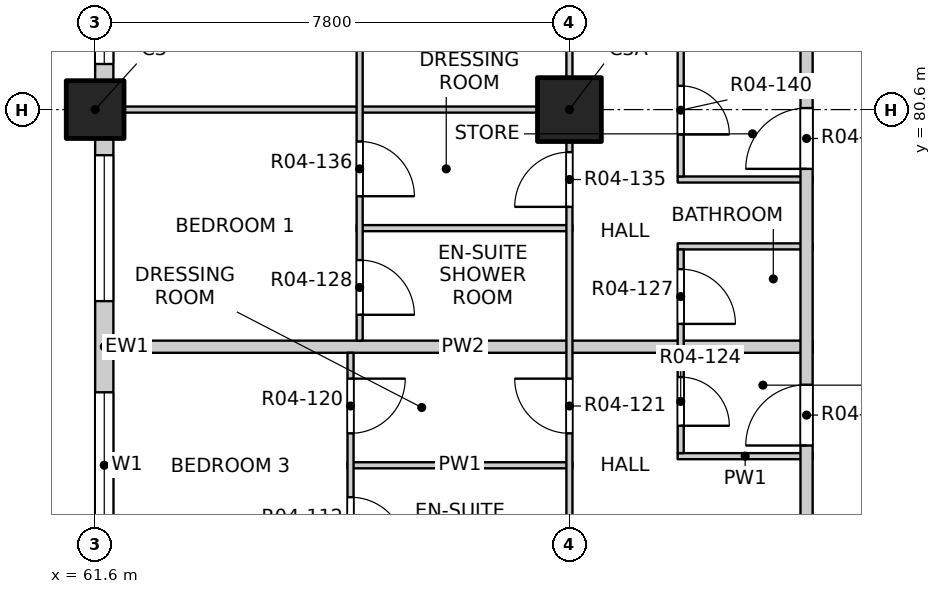
"""IFC4 building model, lengths in metres.
Left out: names, types, materials, properties, quantities, classifications, styles, units other than length and angle.
Written with IfcOpenShell. Run it as: python <this file> out.ifc"""

import sys

from ifc_helpers import new_model, si_unit, direction, frame, frame_2d, origin, origin_2d, place, context, subcontext, project, spatial, rectangle, extrude, element, fill, save


model = new_model("IFC4")
c1 = context("Model", 3, precision=1e-05, world=origin(), true_north=direction((0.0, 1.0)))
c2 = subcontext(c1, "Body", "Model", "MODEL_VIEW")
j1 = project(units=[si_unit("LENGTHUNIT", "METRE"), si_unit("PLANEANGLEUNIT", "RADIAN")], contexts=[c1])
p1 = place(None, origin())
s1 = spatial("IfcSite", under=j1, at=p1, CompositionType="ELEMENT")
p2 = place(p1, origin())
s2 = spatial("IfcBuilding", under=s1, at=p2, CompositionType="ELEMENT")
p3 = place(p2, frame((0.0, 0.0, 58.0)))
s3 = spatial("IfcBuildingStorey", under=s2, at=p3, CompositionType="ELEMENT", Elevation=58.0)
p4 = place(p3, frame((61.6, 80.6, -0.25), z_axis=(0.0, 0.0, 1.0), x_axis=(1.0, 0.0, 0.0)))
e1 = element("IfcColumn", 1, at=p4, inside=s3, PredefinedType="COLUMN", context=c2, shape_type="SweptSolid", body=[
    extrude(rectangle(XDim=0.95, YDim=0.95, at=origin_2d()), origin(), (0.0, 0.0, 1.0), 3.4),
])
p5 = place(p3, frame((69.4, 80.6, -0.25), z_axis=(0.0, 0.0, 1.0), x_axis=(1.0, 0.0, 0.0)))
e2 = element("IfcColumn", 2, at=p5, inside=s3, PredefinedType="COLUMN", context=c2, shape_type="SweptSolid", body=[
    extrude(rectangle(XDim=1.05, YDim=1.05, at=origin_2d()), origin(), (0.0, 0.0, 1.0), 3.4),
])
p6 = place(p3, frame((61.75, 73.275, 0.0), z_axis=(0.0, 0.0, 1.0), x_axis=(0.0, 1.0, 0.0)))
e3 = element("IfcWall", 3, at=p6, inside=s3, PredefinedType="SOLIDWALL", context=c2, shape_type="SweptSolid", body=[
    extrude(rectangle(XDim=6.85, YDim=0.3, at=frame_2d((3.425, 0.0))), origin(), (0.0, 0.0, 1.0), 2.7),
])
p7 = place(p6, frame((0.275, 0.0, 0.9)))
e4 = element("IfcOpeningElement", 4, at=p7, cuts=e3, PredefinedType="OPENING", context=c2, shape_type="SweptSolid", body=[
    extrude(rectangle(XDim=2.4, YDim=1.8, at=frame_2d((1.2, 0.9))), frame((0.0, 0.16, 0.0), z_axis=(0.0, -1.0, 0.0), x_axis=(1.0, 0.0, 0.0)), (0.0, 0.0, 1.0), 0.32),
])
p8 = place(p6, frame((4.175, 0.0, 0.9)))
e5 = element("IfcOpeningElement", 5, at=p8, cuts=e3, PredefinedType="OPENING", context=c2, shape_type="SweptSolid", body=[
    extrude(rectangle(XDim=2.4, YDim=1.8, at=frame_2d((1.2, 0.9))), frame((0.0, 0.16, 0.0), z_axis=(0.0, -1.0, 0.0), x_axis=(1.0, 0.0, 0.0)), (0.0, 0.0, 1.0), 0.32),
])
p9 = place(p3, frame((61.75, 81.075, 0.0), z_axis=(0.0, 0.0, 1.0), x_axis=(0.0, 1.0, 0.0)))
e6 = element("IfcWall", 6, at=p9, inside=s3, PredefinedType="SOLIDWALL", context=c2, shape_type="SweptSolid", body=[
    extrude(rectangle(XDim=3.425, YDim=0.3, at=frame_2d((1.712, 0.0))), origin(), (0.0, 0.0, 1.0), 2.7),
])
p10 = place(p9, frame((0.275, 0.0, 0.9)))
e7 = element("IfcOpeningElement", 7, at=p10, cuts=e6, PredefinedType="OPENING", context=c2, shape_type="SweptSolid", body=[
    extrude(rectangle(XDim=2.4, YDim=1.8, at=frame_2d((1.2, 0.9))), frame((0.0, 0.16, 0.0), z_axis=(0.0, -1.0, 0.0), x_axis=(1.0, 0.0, 0.0)), (0.0, 0.0, 1.0), 0.32),
])
p11 = place(p3, frame((65.75, 74.75, 0.0), z_axis=(0.0, 0.0, 1.0), x_axis=(1.0, 0.0, 0.0)))
e8 = element("IfcWall", 8, at=p11, inside=s3, PredefinedType="PARTITIONING", context=c2, shape_type="SweptSolid", body=[
    extrude(rectangle(XDim=3.7, YDim=0.1, at=frame_2d((1.85, 0.0))), origin(), (0.0, 0.0, 1.0), 3.15),
])
p12 = place(p3, frame((71.18, 74.9, 0.0), z_axis=(0.0, 0.0, 1.0), x_axis=(1.0, 0.0, 0.0)))
e9 = element("IfcWall", 9, at=p12, inside=s3, PredefinedType="PARTITIONING", context=c2, shape_type="SweptSolid", body=[
    extrude(rectangle(XDim=2.22, YDim=0.1, at=frame_2d((1.11, 0.0))), origin(), (0.0, 0.0, 1.0), 3.15),
])
p13 = place(p3, frame((61.9, 76.7, 0.0), z_axis=(0.0, 0.0, 1.0), x_axis=(1.0, 0.0, 0.0)))
e10 = element("IfcWall", 10, at=p13, inside=s3, PredefinedType="PARTITIONING", context=c2, shape_type="SweptSolid", body=[
    extrude(rectangle(XDim=11.5, YDim=0.2, at=frame_2d((5.75, 0.0))), origin(), (0.0, 0.0, 1.0), 3.15),
])
p14 = place(p3, frame((71.18, 78.35, 0.0), z_axis=(0.0, 0.0, 1.0), x_axis=(1.0, 0.0, 0.0)))
e11 = element("IfcWall", 11, at=p14, inside=s3, PredefinedType="PARTITIONING", context=c2, shape_type="SweptSolid", body=[
    extrude(rectangle(XDim=2.22, YDim=0.1, at=frame_2d((1.11, 0.0))), origin(), (0.0, 0.0, 1.0), 3.15),
])
p15 = place(p3, frame((65.9, 78.65, 0.0), z_axis=(0.0, 0.0, 1.0), x_axis=(1.0, 0.0, 0.0)))
e12 = element("IfcWall", 12, at=p15, inside=s3, PredefinedType="PARTITIONING", context=c2, shape_type="SweptSolid", body=[
    extrude(rectangle(XDim=3.55, YDim=0.1, at=frame_2d((1.775, 0.0))), origin(), (0.0, 0.0, 1.0), 3.15),
])
p16 = place(p3, frame((71.18, 79.45, 0.0), z_axis=(0.0, 0.0, 1.0), x_axis=(1.0, 0.0, 0.0)))
e13 = element("IfcWall", 13, at=p16, inside=s3, PredefinedType="PARTITIONING", context=c2, shape_type="SweptSolid", body=[
    extrude(rectangle(XDim=2.22, YDim=0.1, at=frame_2d((1.11, 0.0))), origin(), (0.0, 0.0, 1.0), 3.15),
])
p17 = place(p3, frame((61.9, 80.6, 0.0), z_axis=(0.0, 0.0, 1.0), x_axis=(1.0, 0.0, 0.0)))
e14 = element("IfcWall", 14, at=p17, inside=s3, PredefinedType="PARTITIONING", context=c2, shape_type="SweptSolid", body=[
    extrude(rectangle(XDim=7.55, YDim=0.1, at=frame_2d((3.775, 0.0))), origin(), (0.0, 0.0, 1.0), 2.55),
])
p18 = place(p3, frame((65.8, 61.2, 0.0), z_axis=(0.0, 0.0, 1.0), x_axis=(0.0, 1.0, 0.0)))
e15 = element("IfcWall", 15, at=p18, inside=s3, PredefinedType="PARTITIONING", context=c2, shape_type="SweptSolid", body=[
    extrude(rectangle(XDim=15.4, YDim=0.1, at=frame_2d((7.7, 0.0))), origin(), (0.0, 0.0, 1.0), 3.15),
])
p19 = place(p18, frame((1.25, 0.0, 0.0)))
e16 = element("IfcOpeningElement", 16, at=p19, cuts=e15, PredefinedType="OPENING", context=c2, shape_type="SweptSolid", body=[
    extrude(rectangle(XDim=1.2, YDim=2.1, at=frame_2d((0.6, 1.05))), frame((0.0, 0.06, 0.0), z_axis=(0.0, -1.0, 0.0), x_axis=(1.0, 0.0, 0.0)), (0.0, 0.0, 1.0), 0.12),
])
p20 = place(p18, frame((4.325, 0.0, 0.0)))
e17 = element("IfcOpeningElement", 17, at=p20, cuts=e15, PredefinedType="OPENING", context=c2, shape_type="SweptSolid", body=[
    extrude(rectangle(XDim=0.9, YDim=2.1, at=frame_2d((0.45, 1.05))), frame((0.0, 0.06, 0.0), z_axis=(0.0, -1.0, 0.0), x_axis=(1.0, 0.0, 0.0)), (0.0, 0.0, 1.0), 0.12),
])
p21 = place(p18, frame((6.275, 0.0, 0.0)))
e18 = element("IfcOpeningElement", 18, at=p21, cuts=e15, PredefinedType="OPENING", context=c2, shape_type="SweptSolid", body=[
    extrude(rectangle(XDim=0.9, YDim=2.1, at=frame_2d((0.45, 1.05))), frame((0.0, 0.06, 0.0), z_axis=(0.0, -1.0, 0.0), x_axis=(1.0, 0.0, 0.0)), (0.0, 0.0, 1.0), 0.12),
])
p22 = place(p18, frame((8.225, 0.0, 0.0)))
e19 = element("IfcOpeningElement", 19, at=p22, cuts=e15, PredefinedType="OPENING", context=c2, shape_type="SweptSolid", body=[
    extrude(rectangle(XDim=0.9, YDim=2.1, at=frame_2d((0.45, 1.05))), frame((0.0, 0.06, 0.0), z_axis=(0.0, -1.0, 0.0), x_axis=(1.0, 0.0, 0.0)), (0.0, 0.0, 1.0), 0.12),
])
p23 = place(p18, frame((10.175, 0.0, 0.0)))
e20 = element("IfcOpeningElement", 20, at=p23, cuts=e15, PredefinedType="OPENING", context=c2, shape_type="SweptSolid", body=[
    extrude(rectangle(XDim=0.9, YDim=2.1, at=frame_2d((0.45, 1.05))), frame((0.0, 0.06, 0.0), z_axis=(0.0, -1.0, 0.0), x_axis=(1.0, 0.0, 0.0)), (0.0, 0.0, 1.0), 0.12),
])
p24 = place(p18, frame((12.125, 0.0, 0.0)))
e21 = element("IfcOpeningElement", 21, at=p24, cuts=e15, PredefinedType="OPENING", context=c2, shape_type="SweptSolid", body=[
    extrude(rectangle(XDim=0.9, YDim=2.1, at=frame_2d((0.45, 1.05))), frame((0.0, 0.06, 0.0), z_axis=(0.0, -1.0, 0.0), x_axis=(1.0, 0.0, 0.0)), (0.0, 0.0, 1.0), 0.12),
])
p25 = place(p18, frame((14.075, 0.0, 0.0)))
e22 = element("IfcOpeningElement", 22, at=p25, cuts=e15, PredefinedType="OPENING", context=c2, shape_type="SweptSolid", body=[
    extrude(rectangle(XDim=0.9, YDim=2.1, at=frame_2d((0.45, 1.05))), frame((0.0, 0.06, 0.0), z_axis=(0.0, -1.0, 0.0), x_axis=(1.0, 0.0, 0.0)), (0.0, 0.0, 1.0), 0.12),
])
p26 = place(p3, frame((65.95, 76.8, 0.0), z_axis=(0.0, 0.0, 1.0), x_axis=(0.0, 1.0, 0.0)))
e23 = element("IfcWall", 23, at=p26, inside=s3, PredefinedType="PARTITIONING", context=c2, shape_type="SweptSolid", body=[
    extrude(rectangle(XDim=11.3, YDim=0.1, at=frame_2d((5.65, 0.0))), origin(), (0.0, 0.0, 1.0), 3.15),
])
p27 = place(p26, frame((0.425, 0.0, 0.0)))
e24 = element("IfcOpeningElement", 24, at=p27, cuts=e23, PredefinedType="OPENING", context=c2, shape_type="SweptSolid", body=[
    extrude(rectangle(XDim=0.9, YDim=2.1, at=frame_2d((0.45, 1.05))), frame((0.0, 0.06, 0.0), z_axis=(0.0, -1.0, 0.0), x_axis=(1.0, 0.0, 0.0)), (0.0, 0.0, 1.0), 0.12),
])
p28 = place(p26, frame((2.375, 0.0, 0.0)))
e25 = element("IfcOpeningElement", 25, at=p28, cuts=e23, PredefinedType="OPENING", context=c2, shape_type="SweptSolid", body=[
    extrude(rectangle(XDim=0.9, YDim=2.1, at=frame_2d((0.45, 1.05))), frame((0.0, 0.06, 0.0), z_axis=(0.0, -1.0, 0.0), x_axis=(1.0, 0.0, 0.0)), (0.0, 0.0, 1.0), 0.12),
])
p29 = place(p26, frame((5.15, 0.0, 0.0)))
e26 = element("IfcOpeningElement", 26, at=p29, cuts=e23, PredefinedType="OPENING", context=c2, shape_type="SweptSolid", body=[
    extrude(rectangle(XDim=1.2, YDim=2.1, at=frame_2d((0.6, 1.05))), frame((0.0, 0.06, 0.0), z_axis=(0.0, -1.0, 0.0), x_axis=(1.0, 0.0, 0.0)), (0.0, 0.0, 1.0), 0.12),
])
p30 = place(p26, frame((9.05, 0.0, 0.0)))
e27 = element("IfcOpeningElement", 27, at=p30, cuts=e23, PredefinedType="OPENING", context=c2, shape_type="SweptSolid", body=[
    extrude(rectangle(XDim=1.2, YDim=2.1, at=frame_2d((0.6, 1.05))), frame((0.0, 0.06, 0.0), z_axis=(0.0, -1.0, 0.0), x_axis=(1.0, 0.0, 0.0)), (0.0, 0.0, 1.0), 0.12),
])
p31 = place(p3, frame((69.4, 49.4, 0.0), z_axis=(0.0, 0.0, 1.0), x_axis=(0.0, 1.0, 0.0)))
e28 = element("IfcWall", 28, at=p31, inside=s3, PredefinedType="PARTITIONING", context=c2, shape_type="SweptSolid", body=[
    extrude(rectangle(XDim=31.2, YDim=0.1, at=frame_2d((15.6, 0.0))), origin(), (0.0, 0.0, 1.0), 3.15),
])
p32 = place(p31, frame((2.475, 0.0, 0.0)))
e29 = element("IfcOpeningElement", 29, at=p32, cuts=e28, PredefinedType="OPENING", context=c2, shape_type="SweptSolid", body=[
    extrude(rectangle(XDim=0.9, YDim=2.1, at=frame_2d((0.45, 1.05))), frame((0.0, 0.06, 0.0), z_axis=(0.0, -1.0, 0.0), x_axis=(1.0, 0.0, 0.0)), (0.0, 0.0, 1.0), 0.12),
])
p33 = place(p31, frame((5.4, 0.0, 0.0)))
e30 = element("IfcOpeningElement", 30, at=p33, cuts=e28, PredefinedType="OPENING", context=c2, shape_type="SweptSolid", body=[
    extrude(rectangle(XDim=0.9, YDim=2.1, at=frame_2d((0.45, 1.05))), frame((0.0, 0.06, 0.0), z_axis=(0.0, -1.0, 0.0), x_axis=(1.0, 0.0, 0.0)), (0.0, 0.0, 1.0), 0.12),
])
p34 = place(p31, frame((10.275, 0.0, 0.0)))
e31 = element("IfcOpeningElement", 31, at=p34, cuts=e28, PredefinedType="OPENING", context=c2, shape_type="SweptSolid", body=[
    extrude(rectangle(XDim=0.9, YDim=2.1, at=frame_2d((0.45, 1.05))), frame((0.0, 0.06, 0.0), z_axis=(0.0, -1.0, 0.0), x_axis=(1.0, 0.0, 0.0)), (0.0, 0.0, 1.0), 0.12),
])
p35 = place(p31, frame((13.2, 0.0, 0.0)))
e32 = element("IfcOpeningElement", 32, at=p35, cuts=e28, PredefinedType="OPENING", context=c2, shape_type="SweptSolid", body=[
    extrude(rectangle(XDim=0.9, YDim=2.1, at=frame_2d((0.45, 1.05))), frame((0.0, 0.06, 0.0), z_axis=(0.0, -1.0, 0.0), x_axis=(1.0, 0.0, 0.0)), (0.0, 0.0, 1.0), 0.12),
])
p36 = place(p31, frame((18.075, 0.0, 0.0)))
e33 = element("IfcOpeningElement", 33, at=p36, cuts=e28, PredefinedType="OPENING", context=c2, shape_type="SweptSolid", body=[
    extrude(rectangle(XDim=0.9, YDim=2.1, at=frame_2d((0.45, 1.05))), frame((0.0, 0.06, 0.0), z_axis=(0.0, -1.0, 0.0), x_axis=(1.0, 0.0, 0.0)), (0.0, 0.0, 1.0), 0.12),
])
p37 = place(p31, frame((21.8, 0.0, 0.0)))
e34 = element("IfcOpeningElement", 34, at=p37, cuts=e28, PredefinedType="OPENING", context=c2, shape_type="SweptSolid", body=[
    extrude(rectangle(XDim=0.9, YDim=2.1, at=frame_2d((0.45, 1.05))), frame((0.0, 0.06, 0.0), z_axis=(0.0, -1.0, 0.0), x_axis=(1.0, 0.0, 0.0)), (0.0, 0.0, 1.0), 0.12),
])
p38 = place(p31, frame((25.875, 0.0, 0.0)))
e35 = element("IfcOpeningElement", 35, at=p38, cuts=e28, PredefinedType="OPENING", context=c2, shape_type="SweptSolid", body=[
    extrude(rectangle(XDim=0.9, YDim=2.1, at=frame_2d((0.45, 1.05))), frame((0.0, 0.06, 0.0), z_axis=(0.0, -1.0, 0.0), x_axis=(1.0, 0.0, 0.0)), (0.0, 0.0, 1.0), 0.12),
])
p39 = place(p31, frame((29.6, 0.0, 0.0)))
e36 = element("IfcOpeningElement", 36, at=p39, cuts=e28, PredefinedType="OPENING", context=c2, shape_type="SweptSolid", body=[
    extrude(rectangle(XDim=0.9, YDim=2.1, at=frame_2d((0.45, 1.05))), frame((0.0, 0.06, 0.0), z_axis=(0.0, -1.0, 0.0), x_axis=(1.0, 0.0, 0.0)), (0.0, 0.0, 1.0), 0.12),
])
p40 = place(p3, frame((69.4, 80.6, 0.0), z_axis=(0.0, 0.0, 1.0), x_axis=(0.0, 1.0, 0.0)))
e37 = element("IfcWall", 37, at=p40, inside=s3, PredefinedType="PARTITIONING", context=c2, shape_type="SweptSolid", body=[
    extrude(rectangle(XDim=7.5, YDim=0.1, at=frame_2d((3.75, 0.0))), origin(), (0.0, 0.0, 1.0), 2.55),
])
p41 = place(p40, frame((1.5, 0.0, 0.0)))
e38 = element("IfcOpeningElement", 38, at=p41, cuts=e37, PredefinedType="OPENING", context=c2, shape_type="SweptSolid", body=[
    extrude(rectangle(XDim=0.9, YDim=2.1, at=frame_2d((0.45, 1.05))), frame((0.0, 0.06, 0.0), z_axis=(0.0, -1.0, 0.0), x_axis=(1.0, 0.0, 0.0)), (0.0, 0.0, 1.0), 0.12),
])
p42 = place(p40, frame((5.4, 0.0, 0.0)))
e39 = element("IfcOpeningElement", 39, at=p42, cuts=e37, PredefinedType="OPENING", context=c2, shape_type="SweptSolid", body=[
    extrude(rectangle(XDim=0.9, YDim=2.1, at=frame_2d((0.45, 1.05))), frame((0.0, 0.06, 0.0), z_axis=(0.0, -1.0, 0.0), x_axis=(1.0, 0.0, 0.0)), (0.0, 0.0, 1.0), 0.12),
])
p43 = place(p3, frame((71.23, 74.95, 0.0), z_axis=(0.0, 0.0, 1.0), x_axis=(0.0, 1.0, 0.0)))
e40 = element("IfcWall", 40, at=p43, inside=s3, PredefinedType="PARTITIONING", context=c2, shape_type="SweptSolid", body=[
    extrude(rectangle(XDim=3.35, YDim=0.1, at=frame_2d((1.675, 0.0))), origin(), (0.0, 0.0, 1.0), 3.15),
])
p44 = place(p43, frame((0.45, 0.0, 0.0)))
e41 = element("IfcOpeningElement", 41, at=p44, cuts=e40, PredefinedType="OPENING", context=c2, shape_type="SweptSolid", body=[
    extrude(rectangle(XDim=0.8, YDim=2.1, at=frame_2d((0.4, 1.05))), frame((0.0, 0.06, 0.0), z_axis=(0.0, -1.0, 0.0), x_axis=(1.0, 0.0, 0.0)), (0.0, 0.0, 1.0), 0.12),
])
p45 = place(p43, frame((2.125, 0.0, 0.0)))
e42 = element("IfcOpeningElement", 42, at=p45, cuts=e40, PredefinedType="OPENING", context=c2, shape_type="SweptSolid", body=[
    extrude(rectangle(XDim=0.9, YDim=2.1, at=frame_2d((0.45, 1.05))), frame((0.0, 0.06, 0.0), z_axis=(0.0, -1.0, 0.0), x_axis=(1.0, 0.0, 0.0)), (0.0, 0.0, 1.0), 0.12),
])
p46 = place(p3, frame((71.23, 79.5, 0.0), z_axis=(0.0, 0.0, 1.0), x_axis=(0.0, 1.0, 0.0)))
e43 = element("IfcWall", 43, at=p46, inside=s3, PredefinedType="PARTITIONING", context=c2, shape_type="SweptSolid", body=[
    extrude(rectangle(XDim=4.95, YDim=0.1, at=frame_2d((2.475, 0.0))), origin(), (0.0, 0.0, 1.0), 3.15),
])
p47 = place(p46, frame((0.69, 0.0, 0.0)))
e44 = element("IfcOpeningElement", 44, at=p47, cuts=e43, PredefinedType="OPENING", context=c2, shape_type="SweptSolid", body=[
    extrude(rectangle(XDim=0.8, YDim=2.1, at=frame_2d((0.4, 1.05))), frame((0.0, 0.06, 0.0), z_axis=(0.0, -1.0, 0.0), x_axis=(1.0, 0.0, 0.0)), (0.0, 0.0, 1.0), 0.12),
])
p48 = place(p46, frame((3.165, 0.0, 0.0)))
e45 = element("IfcOpeningElement", 45, at=p48, cuts=e43, PredefinedType="OPENING", context=c2, shape_type="SweptSolid", body=[
    extrude(rectangle(XDim=0.9, YDim=2.1, at=frame_2d((0.45, 1.05))), frame((0.0, 0.06, 0.0), z_axis=(0.0, -1.0, 0.0), x_axis=(1.0, 0.0, 0.0)), (0.0, 0.0, 1.0), 0.12),
])
p49 = place(p3, frame((73.3, 53.4, 0.0), z_axis=(0.0, 0.0, 1.0), x_axis=(0.0, 1.0, 0.0)))
e46 = element("IfcWall", 46, at=p49, inside=s3, PredefinedType="PARTITIONING", context=c2, shape_type="SweptSolid", body=[
    extrude(rectangle(XDim=31.0, YDim=0.2, at=frame_2d((15.5, 0.0))), origin(), (0.0, 0.0, 1.0), 3.15),
])
p50 = place(p49, frame((3.325, 0.0, 0.0)))
e47 = element("IfcOpeningElement", 47, at=p50, cuts=e46, PredefinedType="OPENING", context=c2, shape_type="SweptSolid", body=[
    extrude(rectangle(XDim=1.0, YDim=2.1, at=frame_2d((0.5, 1.05))), frame((0.0, 0.11, 0.0), z_axis=(0.0, -1.0, 0.0), x_axis=(1.0, 0.0, 0.0)), (0.0, 0.0, 1.0), 0.22),
])
p51 = place(p49, frame((21.675, 0.0, 0.0)))
e48 = element("IfcOpeningElement", 48, at=p51, cuts=e46, PredefinedType="OPENING", context=c2, shape_type="SweptSolid", body=[
    extrude(rectangle(XDim=1.0, YDim=2.1, at=frame_2d((0.5, 1.05))), frame((0.0, 0.11, 0.0), z_axis=(0.0, -1.0, 0.0), x_axis=(1.0, 0.0, 0.0)), (0.0, 0.0, 1.0), 0.22),
])
p52 = place(p49, frame((26.225, 0.0, 0.0)))
e49 = element("IfcOpeningElement", 49, at=p52, cuts=e46, PredefinedType="OPENING", context=c2, shape_type="SweptSolid", body=[
    extrude(rectangle(XDim=1.0, YDim=2.1, at=frame_2d((0.5, 1.05))), frame((0.0, 0.11, 0.0), z_axis=(0.0, -1.0, 0.0), x_axis=(1.0, 0.0, 0.0)), (0.0, 0.0, 1.0), 0.22),
])
p53 = place(p7, origin())
e50 = element("IfcWindow", 50, at=p53, inside=s3, PartitioningType="DOUBLE_PANEL_VERTICAL", PredefinedType="WINDOW", context=c2, shape_type="SweptSolid", body=[
    extrude(rectangle(XDim=2.4, YDim=1.8, at=frame_2d((1.2, 0.9))), frame((0.0, 0.03, 0.0), z_axis=(0.0, -1.0, 0.0), x_axis=(1.0, 0.0, 0.0)), (0.0, 0.0, 1.0), 0.06),
])
fill(e4, e50)
p54 = place(p8, origin())
e51 = element("IfcWindow", 51, at=p54, inside=s3, PartitioningType="DOUBLE_PANEL_VERTICAL", PredefinedType="WINDOW", context=c2, shape_type="SweptSolid", body=[
    extrude(rectangle(XDim=2.4, YDim=1.8, at=frame_2d((1.2, 0.9))), frame((0.0, 0.03, 0.0), z_axis=(0.0, -1.0, 0.0), x_axis=(1.0, 0.0, 0.0)), (0.0, 0.0, 1.0), 0.06),
])
fill(e5, e51)
p55 = place(p10, origin())
e52 = element("IfcWindow", 52, at=p55, inside=s3, PartitioningType="DOUBLE_PANEL_VERTICAL", PredefinedType="WINDOW", context=c2, shape_type="SweptSolid", body=[
    extrude(rectangle(XDim=2.4, YDim=1.8, at=frame_2d((1.2, 0.9))), frame((0.0, 0.03, 0.0), z_axis=(0.0, -1.0, 0.0), x_axis=(1.0, 0.0, 0.0)), (0.0, 0.0, 1.0), 0.06),
])
fill(e7, e52)
p56 = place(p24, origin())
e53 = element("IfcDoor", 53, at=p56, inside=s3, OperationType="SINGLE_SWING_RIGHT", PredefinedType="DOOR", context=c2, shape_type="SweptSolid", body=[
    extrude(rectangle(XDim=0.9, YDim=2.1, at=frame_2d((0.45, 1.05))), frame((0.0, 0.025, 0.0), z_axis=(0.0, -1.0, 0.0), x_axis=(1.0, 0.0, 0.0)), (0.0, 0.0, 1.0), 0.05),
])
fill(e21, e53)
p57 = place(p51, origin())
e54 = element("IfcDoor", 54, at=p57, inside=s3, OperationType="SINGLE_SWING_RIGHT", PredefinedType="DOOR", context=c2, shape_type="SweptSolid", body=[
    extrude(rectangle(XDim=1.0, YDim=2.1, at=frame_2d((0.5, 1.05))), frame((0.0, 0.025, 0.0), z_axis=(0.0, -1.0, 0.0), x_axis=(1.0, 0.0, 0.0)), (0.0, 0.0, 1.0), 0.05),
])
fill(e48, e54)
p58 = place(p25, origin())
e55 = element("IfcDoor", 55, at=p58, inside=s3, OperationType="SINGLE_SWING_LEFT", PredefinedType="DOOR", context=c2, shape_type="SweptSolid", body=[
    extrude(rectangle(XDim=0.9, YDim=2.1, at=frame_2d((0.45, 1.05))), frame((0.0, 0.025, 0.0), z_axis=(0.0, -1.0, 0.0), x_axis=(1.0, 0.0, 0.0)), (0.0, 0.0, 1.0), 0.05),
])
fill(e22, e55)
p59 = place(p38, origin())
e56 = element("IfcDoor", 56, at=p59, inside=s3, OperationType="SINGLE_SWING_RIGHT", PredefinedType="DOOR", context=c2, shape_type="SweptSolid", body=[
    extrude(rectangle(XDim=0.9, YDim=2.1, at=frame_2d((0.45, 1.05))), frame((0.0, 0.025, 0.0), z_axis=(0.0, -1.0, 0.0), x_axis=(1.0, 0.0, 0.0)), (0.0, 0.0, 1.0), 0.05),
])
fill(e35, e56)
p60 = place(p44, origin())
e57 = element("IfcDoor", 57, at=p60, inside=s3, OperationType="SINGLE_SWING_RIGHT", PredefinedType="DOOR", context=c2, shape_type="SweptSolid", body=[
    extrude(rectangle(XDim=0.8, YDim=2.1, at=frame_2d((0.4, 1.05))), frame((0.0, 0.025, 0.0), z_axis=(0.0, -1.0, 0.0), x_axis=(1.0, 0.0, 0.0)), (0.0, 0.0, 1.0), 0.05),
])
fill(e41, e57)
p61 = place(p45, origin())
e58 = element("IfcDoor", 58, at=p61, inside=s3, OperationType="SINGLE_SWING_RIGHT", PredefinedType="DOOR", context=c2, shape_type="SweptSolid", body=[
    extrude(rectangle(XDim=0.9, YDim=2.1, at=frame_2d((0.45, 1.05))), frame((0.0, 0.025, 0.0), z_axis=(0.0, -1.0, 0.0), x_axis=(1.0, 0.0, 0.0)), (0.0, 0.0, 1.0), 0.05),
])
fill(e42, e58)
p62 = place(p27, origin())
e59 = element("IfcDoor", 59, at=p62, inside=s3, OperationType="SINGLE_SWING_RIGHT", PredefinedType="DOOR", context=c2, shape_type="SweptSolid", body=[
    extrude(rectangle(XDim=0.9, YDim=2.1, at=frame_2d((0.45, 1.05))), frame((0.0, 0.025, 0.0), z_axis=(0.0, -1.0, 0.0), x_axis=(1.0, 0.0, 0.0)), (0.0, 0.0, 1.0), 0.05),
])
fill(e24, e59)
p63 = place(p39, origin())
e60 = element("IfcDoor", 60, at=p63, inside=s3, OperationType="SINGLE_SWING_LEFT", PredefinedType="DOOR", context=c2, shape_type="SweptSolid", body=[
    extrude(rectangle(XDim=0.9, YDim=2.1, at=frame_2d((0.45, 1.05))), frame((0.0, 0.025, 0.0), z_axis=(0.0, -1.0, 0.0), x_axis=(1.0, 0.0, 0.0)), (0.0, 0.0, 1.0), 0.05),
])
fill(e36, e60)
p64 = place(p28, origin())
e61 = element("IfcDoor", 61, at=p64, inside=s3, OperationType="SINGLE_SWING_RIGHT", PredefinedType="DOOR", context=c2, shape_type="SweptSolid", body=[
    extrude(rectangle(XDim=0.9, YDim=2.1, at=frame_2d((0.45, 1.05))), frame((0.0, 0.025, 0.0), z_axis=(0.0, -1.0, 0.0), x_axis=(1.0, 0.0, 0.0)), (0.0, 0.0, 1.0), 0.05),
])
fill(e25, e61)
p65 = place(p52, origin())
e62 = element("IfcDoor", 62, at=p65, inside=s3, OperationType="SINGLE_SWING_RIGHT", PredefinedType="DOOR", context=c2, shape_type="SweptSolid", body=[
    extrude(rectangle(XDim=1.0, YDim=2.1, at=frame_2d((0.5, 1.05))), frame((0.0, 0.025, 0.0), z_axis=(0.0, -1.0, 0.0), x_axis=(1.0, 0.0, 0.0)), (0.0, 0.0, 1.0), 0.05),
])
fill(e49, e62)
p66 = place(p47, origin())
e63 = element("IfcDoor", 63, at=p66, inside=s3, OperationType="SINGLE_SWING_RIGHT", PredefinedType="DOOR", context=c2, shape_type="SweptSolid", body=[
    extrude(rectangle(XDim=0.8, YDim=2.1, at=frame_2d((0.4, 1.05))), frame((0.0, 0.025, 0.0), z_axis=(0.0, -1.0, 0.0), x_axis=(1.0, 0.0, 0.0)), (0.0, 0.0, 1.0), 0.05),
])
fill(e44, e63)
save(model, sys.argv[1])
